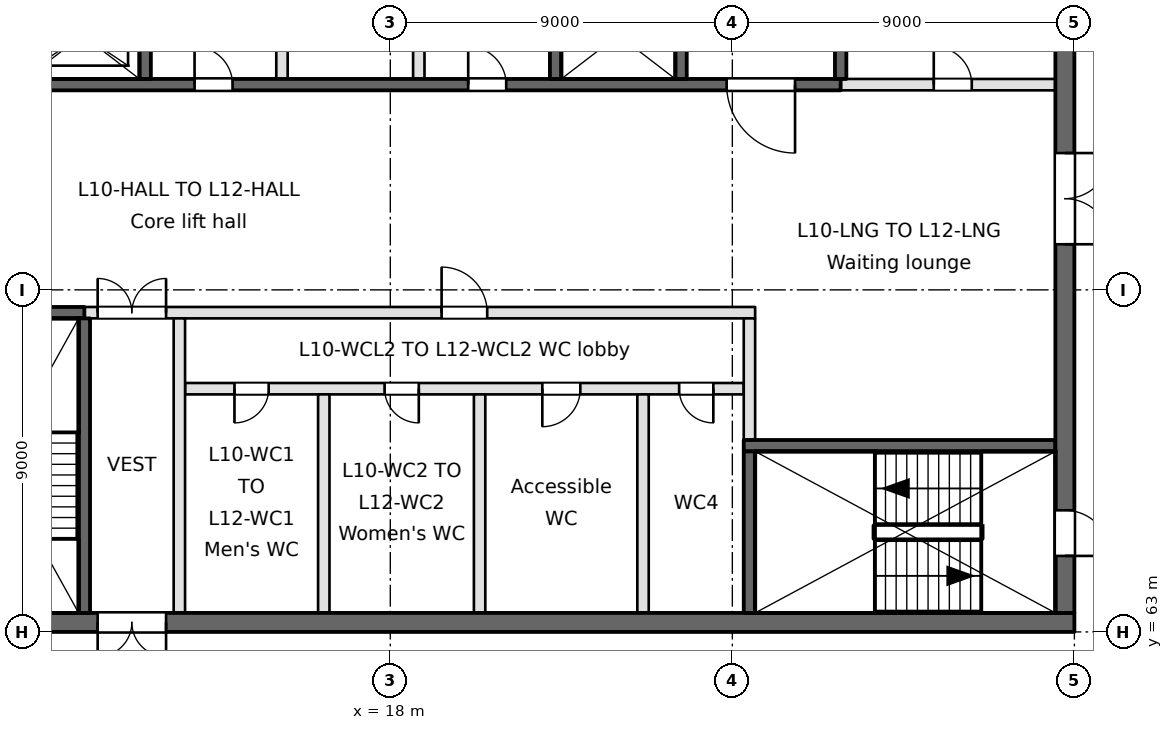
"""IFC4 building model, lengths in metres.
Left out: names, types, materials, properties, quantities, classifications, styles, units other than length and angle.
Written with IfcOpenShell. Run it as: python <this file> out.ifc"""

import sys

from ifc_helpers import new_model, si_unit, direction, frame, frame_2d, origin, place, context, subcontext, project, spatial, rectangle, extrude, element, fill, save


model = new_model("IFC4")
c1 = context("Model", 3, precision=1e-05, world=origin(), true_north=direction((0.0, 1.0)))
c2 = subcontext(c1, "Body", "Model", "MODEL_VIEW")
j1 = project(units=[si_unit("LENGTHUNIT", "METRE"), si_unit("PLANEANGLEUNIT", "RADIAN")], contexts=[c1])
p1 = place(None, origin())
s1 = spatial("IfcSite", under=j1, at=p1, CompositionType="ELEMENT")
p2 = place(p1, origin())
s2 = spatial("IfcBuilding", under=s1, at=p2, CompositionType="ELEMENT")
p3 = place(p2, frame((0.0, 0.0, 46.9)))
s3 = spatial("IfcBuildingStorey", under=s2, at=p3, CompositionType="ELEMENT", Elevation=46.9)
p4 = place(p3, frame((0.9, 63.25, -0.4), z_axis=(0.0, 0.0, 1.0), x_axis=(1.0, 0.0, 0.0)))
e1 = element("IfcWall", 1, at=p4, inside=s3, PredefinedType="SOLIDWALL", context=c2, shape_type="SweptSolid", body=[
    extrude(rectangle(XDim=35.1, YDim=0.5, at=frame_2d((17.55, 0.0))), origin(), (0.0, 0.0, 1.0), 3.7),
])
p5 = place(p4, frame((9.4, 0.0, 0.4)))
e2 = element("IfcOpeningElement", 2, at=p5, cuts=e1, PredefinedType="OPENING", context=c2, shape_type="SweptSolid", body=[
    extrude(rectangle(XDim=1.8, YDim=2.1, at=frame_2d((0.9, 1.05))), frame((0.0, 0.25, 0.0), z_axis=(0.0, -1.0, 0.0), x_axis=(1.0, 0.0, 0.0)), (0.0, 0.0, 1.0), 0.5),
])
p6 = place(p4, frame((1.55, 0.0, 0.4)))
e3 = element("IfcOpeningElement", 3, at=p6, cuts=e1, PredefinedType="OPENING", context=c2, shape_type="SweptSolid", body=[
    extrude(rectangle(XDim=1.2, YDim=2.1, at=frame_2d((0.6, 1.05))), frame((0.0, 0.25, 0.0), z_axis=(0.0, -1.0, 0.0), x_axis=(1.0, 0.0, 0.0)), (0.0, 0.0, 1.0), 0.5),
])
p7 = place(p4, frame((6.15, 0.0, 0.4)))
e4 = element("IfcOpeningElement", 4, at=p7, cuts=e1, PredefinedType="OPENING", context=c2, shape_type="SweptSolid", body=[
    extrude(rectangle(XDim=1.2, YDim=2.1, at=frame_2d((0.6, 1.05))), frame((0.0, 0.25, 0.0), z_axis=(0.0, -1.0, 0.0), x_axis=(1.0, 0.0, 0.0)), (0.0, 0.0, 1.0), 0.5),
])
p8 = place(p3, frame((27.3, 67.9, -0.4), z_axis=(0.0, 0.0, 1.0), x_axis=(1.0, 0.0, 0.0)))
e5 = element("IfcWall", 5, at=p8, inside=s3, PredefinedType="SOLIDWALL", context=c2, shape_type="SweptSolid", body=[
    extrude(rectangle(XDim=8.2, YDim=0.3, at=frame_2d((4.1, 0.0))), origin(), (0.0, 0.0, 1.0), 3.7),
])
p9 = place(p3, frame((12.6, 69.4, 0.0), z_axis=(0.0, 0.0, 1.0), x_axis=(1.0, 0.0, 0.0)))
e6 = element("IfcWall", 6, at=p9, inside=s3, PredefinedType="PARTITIONING", context=c2, shape_type="SweptSolid", body=[
    extrude(rectangle(XDim=14.7, YDim=0.3, at=frame_2d((7.35, 0.0))), origin(), (0.0, 0.0, 1.0), 3.3),
])
p10 = place(p9, frame((1.3, 0.0, 0.0)))
e7 = element("IfcOpeningElement", 7, at=p10, cuts=e6, PredefinedType="OPENING", context=c2, shape_type="SweptSolid", body=[
    extrude(rectangle(XDim=0.9, YDim=2.1, at=frame_2d((0.45, 1.05))), frame((0.0, 0.15, 0.0), z_axis=(0.0, -1.0, 0.0), x_axis=(1.0, 0.0, 0.0)), (0.0, 0.0, 1.0), 0.3),
])
p11 = place(p9, frame((5.25, 0.0, 0.0)))
e8 = element("IfcOpeningElement", 8, at=p11, cuts=e6, PredefinedType="OPENING", context=c2, shape_type="SweptSolid", body=[
    extrude(rectangle(XDim=0.9, YDim=2.1, at=frame_2d((0.45, 1.05))), frame((0.0, 0.15, 0.0), z_axis=(0.0, -1.0, 0.0), x_axis=(1.0, 0.0, 0.0)), (0.0, 0.0, 1.0), 0.3),
])
p12 = place(p9, frame((9.4, 0.0, 0.0)))
e9 = element("IfcOpeningElement", 9, at=p12, cuts=e6, PredefinedType="OPENING", context=c2, shape_type="SweptSolid", body=[
    extrude(rectangle(XDim=1.0, YDim=2.1, at=frame_2d((0.5, 1.05))), frame((0.0, 0.15, 0.0), z_axis=(0.0, -1.0, 0.0), x_axis=(1.0, 0.0, 0.0)), (0.0, 0.0, 1.0), 0.3),
])
p13 = place(p9, frame((13.0, 0.0, 0.0)))
e10 = element("IfcOpeningElement", 10, at=p13, cuts=e6, PredefinedType="OPENING", context=c2, shape_type="SweptSolid", body=[
    extrude(rectangle(XDim=0.9, YDim=2.1, at=frame_2d((0.45, 1.05))), frame((0.0, 0.15, 0.0), z_axis=(0.0, -1.0, 0.0), x_axis=(1.0, 0.0, 0.0)), (0.0, 0.0, 1.0), 0.3),
])
p14 = place(p3, frame((0.9, 71.4, -0.4), z_axis=(0.0, 0.0, 1.0), x_axis=(1.0, 0.0, 0.0)))
e11 = element("IfcWall", 11, at=p14, inside=s3, PredefinedType="SOLIDWALL", context=c2, shape_type="SweptSolid", body=[
    extrude(rectangle(XDim=9.05, YDim=0.3, at=frame_2d((4.525, 0.0))), origin(), (0.0, 0.0, 1.0), 3.7),
])
p15 = place(p3, frame((9.95, 71.4, 0.0), z_axis=(0.0, 0.0, 1.0), x_axis=(1.0, 0.0, 0.0)))
e12 = element("IfcWall", 12, at=p15, inside=s3, PredefinedType="PARTITIONING", context=c2, shape_type="SweptSolid", body=[
    extrude(rectangle(XDim=17.65, YDim=0.3, at=frame_2d((8.825, 0.0))), origin(), (0.0, 0.0, 1.0), 3.3),
])
p16 = place(p15, frame((0.35, 0.0, 0.0)))
e13 = element("IfcOpeningElement", 13, at=p16, cuts=e12, PredefinedType="OPENING", context=c2, shape_type="SweptSolid", body=[
    extrude(rectangle(XDim=1.8, YDim=2.1, at=frame_2d((0.9, 1.05))), frame((0.0, 0.15, 0.0), z_axis=(0.0, -1.0, 0.0), x_axis=(1.0, 0.0, 0.0)), (0.0, 0.0, 1.0), 0.3),
])
p17 = place(p15, frame((9.4, 0.0, 0.0)))
e14 = element("IfcOpeningElement", 14, at=p17, cuts=e12, PredefinedType="OPENING", context=c2, shape_type="SweptSolid", body=[
    extrude(rectangle(XDim=1.2, YDim=2.1, at=frame_2d((0.6, 1.05))), frame((0.0, 0.15, 0.0), z_axis=(0.0, -1.0, 0.0), x_axis=(1.0, 0.0, 0.0)), (0.0, 0.0, 1.0), 0.3),
])
p18 = place(p3, frame((0.9, 77.4, -0.4), z_axis=(0.0, 0.0, 1.0), x_axis=(1.0, 0.0, 0.0)))
e15 = element("IfcWall", 15, at=p18, inside=s3, PredefinedType="SOLIDWALL", context=c2, shape_type="SweptSolid", body=[
    extrude(rectangle(XDim=28.95, YDim=0.3, at=frame_2d((14.475, 0.0))), origin(), (0.0, 0.0, 1.0), 3.7),
])
p19 = place(p18, frame((4.35, 0.0, 0.4)))
e16 = element("IfcOpeningElement", 16, at=p19, cuts=e15, PredefinedType="OPENING", context=c2, shape_type="SweptSolid", body=[
    extrude(rectangle(XDim=1.8, YDim=2.1, at=frame_2d((0.9, 1.05))), frame((0.0, 0.15, 0.0), z_axis=(0.0, -1.0, 0.0), x_axis=(1.0, 0.0, 0.0)), (0.0, 0.0, 1.0), 0.3),
])
p20 = place(p18, frame((25.95, 0.0, 0.4)))
e17 = element("IfcOpeningElement", 17, at=p20, cuts=e15, PredefinedType="OPENING", context=c2, shape_type="SweptSolid", body=[
    extrude(rectangle(XDim=1.8, YDim=2.1, at=frame_2d((0.9, 1.05))), frame((0.0, 0.15, 0.0), z_axis=(0.0, -1.0, 0.0), x_axis=(1.0, 0.0, 0.0)), (0.0, 0.0, 1.0), 0.3),
])
p21 = place(p18, frame((11.95, 0.0, 0.4)))
e18 = element("IfcOpeningElement", 18, at=p21, cuts=e15, PredefinedType="OPENING", context=c2, shape_type="SweptSolid", body=[
    extrude(rectangle(XDim=1.0, YDim=2.1, at=frame_2d((0.5, 1.05))), frame((0.0, 0.15, 0.0), z_axis=(0.0, -1.0, 0.0), x_axis=(1.0, 0.0, 0.0)), (0.0, 0.0, 1.0), 0.3),
])
p22 = place(p18, frame((19.15, 0.0, 0.4)))
e19 = element("IfcOpeningElement", 19, at=p22, cuts=e15, PredefinedType="OPENING", context=c2, shape_type="SweptSolid", body=[
    extrude(rectangle(XDim=1.0, YDim=2.1, at=frame_2d((0.5, 1.05))), frame((0.0, 0.15, 0.0), z_axis=(0.0, -1.0, 0.0), x_axis=(1.0, 0.0, 0.0)), (0.0, 0.0, 1.0), 0.3),
])
p23 = place(p3, frame((29.85, 77.4, 0.0), z_axis=(0.0, 0.0, 1.0), x_axis=(1.0, 0.0, 0.0)))
e20 = element("IfcWall", 20, at=p23, inside=s3, PredefinedType="PARTITIONING", context=c2, shape_type="SweptSolid", body=[
    extrude(rectangle(XDim=5.65, YDim=0.3, at=frame_2d((2.825, 0.0))), origin(), (0.0, 0.0, 1.0), 3.3),
])
p24 = place(p23, frame((2.45, 0.0, 0.0)))
e21 = element("IfcOpeningElement", 21, at=p24, cuts=e20, PredefinedType="OPENING", context=c2, shape_type="SweptSolid", body=[
    extrude(rectangle(XDim=1.0, YDim=2.1, at=frame_2d((0.5, 1.05))), frame((0.0, 0.15, 0.0), z_axis=(0.0, -1.0, 0.0), x_axis=(1.0, 0.0, 0.0)), (0.0, 0.0, 1.0), 0.3),
])
p25 = place(p3, frame((9.95, 63.5, -0.4), z_axis=(0.0, 0.0, 1.0), x_axis=(0.0, 1.0, 0.0)))
e22 = element("IfcWall", 22, at=p25, inside=s3, PredefinedType="SOLIDWALL", context=c2, shape_type="SweptSolid", body=[
    extrude(rectangle(XDim=7.75, YDim=0.3, at=frame_2d((3.875, 0.0))), origin(), (0.0, 0.0, 1.0), 3.7),
])
p26 = place(p3, frame((11.55, 77.55, -0.4), z_axis=(0.0, 0.0, 1.0), x_axis=(0.0, 1.0, 0.0)))
e23 = element("IfcWall", 23, at=p26, inside=s3, PredefinedType="SOLIDWALL", context=c2, shape_type="SweptSolid", body=[
    extrude(rectangle(XDim=10.1, YDim=0.3, at=frame_2d((5.05, 0.0))), origin(), (0.0, 0.0, 1.0), 3.7),
])
p27 = place(p3, frame((12.45, 63.5, 0.0), z_axis=(0.0, 0.0, 1.0), x_axis=(0.0, 1.0, 0.0)))
e24 = element("IfcWall", 24, at=p27, inside=s3, PredefinedType="PARTITIONING", context=c2, shape_type="SweptSolid", body=[
    extrude(rectangle(XDim=7.75, YDim=0.3, at=frame_2d((3.875, 0.0))), origin(), (0.0, 0.0, 1.0), 3.3),
])
p28 = place(p3, frame((15.15, 77.55, 0.0), z_axis=(0.0, 0.0, 1.0), x_axis=(0.0, 1.0, 0.0)))
e25 = element("IfcWall", 25, at=p28, inside=s3, PredefinedType="PARTITIONING", context=c2, shape_type="SweptSolid", body=[
    extrude(rectangle(XDim=12.95, YDim=0.3, at=frame_2d((6.475, 0.0))), origin(), (0.0, 0.0, 1.0), 3.3),
])
p29 = place(p3, frame((16.25, 63.5, 0.0), z_axis=(0.0, 0.0, 1.0), x_axis=(0.0, 1.0, 0.0)))
e26 = element("IfcWall", 26, at=p29, inside=s3, PredefinedType="PARTITIONING", context=c2, shape_type="SweptSolid", body=[
    extrude(rectangle(XDim=5.75, YDim=0.3, at=frame_2d((2.875, 0.0))), origin(), (0.0, 0.0, 1.0), 3.3),
])
p30 = place(p3, frame((18.75, 77.55, 0.0), z_axis=(0.0, 0.0, 1.0), x_axis=(0.0, 1.0, 0.0)))
e27 = element("IfcWall", 27, at=p30, inside=s3, PredefinedType="PARTITIONING", context=c2, shape_type="SweptSolid", body=[
    extrude(rectangle(XDim=12.95, YDim=0.3, at=frame_2d((6.475, 0.0))), origin(), (0.0, 0.0, 1.0), 3.3),
])
p31 = place(p3, frame((20.35, 63.5, 0.0), z_axis=(0.0, 0.0, 1.0), x_axis=(0.0, 1.0, 0.0)))
e28 = element("IfcWall", 28, at=p31, inside=s3, PredefinedType="PARTITIONING", context=c2, shape_type="SweptSolid", body=[
    extrude(rectangle(XDim=5.75, YDim=0.3, at=frame_2d((2.875, 0.0))), origin(), (0.0, 0.0, 1.0), 3.3),
])
p32 = place(p3, frame((22.35, 77.55, -0.4), z_axis=(0.0, 0.0, 1.0), x_axis=(0.0, 1.0, 0.0)))
e29 = element("IfcWall", 29, at=p32, inside=s3, PredefinedType="SOLIDWALL", context=c2, shape_type="SweptSolid", body=[
    extrude(rectangle(XDim=10.1, YDim=0.3, at=frame_2d((5.05, 0.0))), origin(), (0.0, 0.0, 1.0), 3.7),
])
p33 = place(p3, frame((24.65, 63.5, 0.0), z_axis=(0.0, 0.0, 1.0), x_axis=(0.0, 1.0, 0.0)))
e30 = element("IfcWall", 30, at=p33, inside=s3, PredefinedType="PARTITIONING", context=c2, shape_type="SweptSolid", body=[
    extrude(rectangle(XDim=5.75, YDim=0.3, at=frame_2d((2.875, 0.0))), origin(), (0.0, 0.0, 1.0), 3.3),
])
p34 = place(p3, frame((25.65, 77.55, -0.4), z_axis=(0.0, 0.0, 1.0), x_axis=(0.0, 1.0, 0.0)))
e31 = element("IfcWall", 31, at=p34, inside=s3, PredefinedType="SOLIDWALL", context=c2, shape_type="SweptSolid", body=[
    extrude(rectangle(XDim=10.1, YDim=0.3, at=frame_2d((5.05, 0.0))), origin(), (0.0, 0.0, 1.0), 3.7),
])
p35 = place(p3, frame((27.45, 63.5, -0.4), z_axis=(0.0, 0.0, 1.0), x_axis=(0.0, 1.0, 0.0)))
e32 = element("IfcWall", 32, at=p35, inside=s3, PredefinedType="SOLIDWALL", context=c2, shape_type="SweptSolid", body=[
    extrude(rectangle(XDim=4.25, YDim=0.3, at=frame_2d((2.125, 0.0))), origin(), (0.0, 0.0, 1.0), 3.7),
])
p36 = place(p3, frame((27.45, 68.05, 0.0), z_axis=(0.0, 0.0, 1.0), x_axis=(0.0, 1.0, 0.0)))
e33 = element("IfcWall", 33, at=p36, inside=s3, PredefinedType="PARTITIONING", context=c2, shape_type="SweptSolid", body=[
    extrude(rectangle(XDim=3.2, YDim=0.3, at=frame_2d((1.6, 0.0))), origin(), (0.0, 0.0, 1.0), 3.3),
])
p37 = place(p3, frame((29.85, 77.55, -0.4), z_axis=(0.0, 0.0, 1.0), x_axis=(0.0, 1.0, 0.0)))
e34 = element("IfcWall", 34, at=p37, inside=s3, PredefinedType="SOLIDWALL", context=c2, shape_type="SweptSolid", body=[
    extrude(rectangle(XDim=10.1, YDim=0.3, at=frame_2d((5.05, 0.0))), origin(), (0.0, 0.0, 1.0), 3.7),
])
p38 = place(p3, frame((35.75, 63.5, -0.4), z_axis=(0.0, 0.0, 1.0), x_axis=(0.0, 1.0, 0.0)))
e35 = element("IfcWall", 35, at=p38, inside=s3, PredefinedType="SOLIDWALL", context=c2, shape_type="SweptSolid", body=[
    extrude(rectangle(XDim=34.6, YDim=0.5, at=frame_2d((17.3, 0.0))), origin(), (0.0, 0.0, 1.0), 3.7),
])
p39 = place(p38, frame((9.7, 0.0, 0.4)))
e36 = element("IfcOpeningElement", 36, at=p39, cuts=e35, PredefinedType="OPENING", context=c2, shape_type="SweptSolid", body=[
    extrude(rectangle(XDim=2.4, YDim=2.1, at=frame_2d((1.2, 1.05))), frame((0.0, 0.25, 0.0), z_axis=(0.0, -1.0, 0.0), x_axis=(1.0, 0.0, 0.0)), (0.0, 0.0, 1.0), 0.5),
])
p40 = place(p38, frame((27.9, 0.0, 0.4)))
e37 = element("IfcOpeningElement", 37, at=p40, cuts=e35, PredefinedType="OPENING", context=c2, shape_type="SweptSolid", body=[
    extrude(rectangle(XDim=1.5, YDim=2.1, at=frame_2d((0.75, 1.05))), frame((0.0, 0.25, 0.0), z_axis=(0.0, -1.0, 0.0), x_axis=(1.0, 0.0, 0.0)), (0.0, 0.0, 1.0), 0.5),
])
p41 = place(p38, frame((1.5, 0.0, 0.4)))
e38 = element("IfcOpeningElement", 38, at=p41, cuts=e35, PredefinedType="OPENING", context=c2, shape_type="SweptSolid", body=[
    extrude(rectangle(XDim=1.2, YDim=2.1, at=frame_2d((0.6, 1.05))), frame((0.0, 0.25, 0.0), z_axis=(0.0, -1.0, 0.0), x_axis=(1.0, 0.0, 0.0)), (0.0, 0.0, 1.0), 0.5),
])
p42 = place(p20, frame((1.8, 0.0, 0.0), z_axis=(0.0, 0.0, 1.0), x_axis=(-1.0, 0.0, 0.0)))
e39 = element("IfcDoor", 39, at=p42, inside=s3, OperationType="SINGLE_SWING_LEFT", PredefinedType="DOOR", context=c2, shape_type="SweptSolid", body=[
    extrude(rectangle(XDim=1.8, YDim=2.1, at=frame_2d((0.9, 1.05))), frame((0.0, 0.025, 0.0), z_axis=(0.0, -1.0, 0.0), x_axis=(1.0, 0.0, 0.0)), (0.0, 0.0, 1.0), 0.05),
])
fill(e17, e39)
p43 = place(p39, frame((2.4, 0.0, 0.0), z_axis=(0.0, 0.0, 1.0), x_axis=(-1.0, 0.0, 0.0)))
e40 = element("IfcDoor", 40, at=p43, inside=s3, OperationType="DOUBLE_DOOR_SINGLE_SWING", PredefinedType="DOOR", context=c2, shape_type="SweptSolid", body=[
    extrude(rectangle(XDim=2.4, YDim=2.1, at=frame_2d((1.2, 1.05))), frame((0.0, 0.025, 0.0), z_axis=(0.0, -1.0, 0.0), x_axis=(1.0, 0.0, 0.0)), (0.0, 0.0, 1.0), 0.05),
])
fill(e36, e40)
p44 = place(p5, frame((1.8, 0.0, 0.0), z_axis=(0.0, 0.0, 1.0), x_axis=(-1.0, 0.0, 0.0)))
e41 = element("IfcDoor", 41, at=p44, inside=s3, OperationType="DOUBLE_DOOR_SINGLE_SWING", PredefinedType="DOOR", context=c2, shape_type="SweptSolid", body=[
    extrude(rectangle(XDim=1.8, YDim=2.1, at=frame_2d((0.9, 1.05))), frame((0.0, 0.025, 0.0), z_axis=(0.0, -1.0, 0.0), x_axis=(1.0, 0.0, 0.0)), (0.0, 0.0, 1.0), 0.05),
])
fill(e2, e41)
p45 = place(p16, origin())
e42 = element("IfcDoor", 42, at=p45, inside=s3, OperationType="DOUBLE_DOOR_SINGLE_SWING", PredefinedType="DOOR", context=c2, shape_type="SweptSolid", body=[
    extrude(rectangle(XDim=1.8, YDim=2.1, at=frame_2d((0.9, 1.05))), frame((0.0, 0.025, 0.0), z_axis=(0.0, -1.0, 0.0), x_axis=(1.0, 0.0, 0.0)), (0.0, 0.0, 1.0), 0.05),
])
fill(e13, e42)
p46 = place(p10, frame((0.9, 0.0, 0.0), z_axis=(0.0, 0.0, 1.0), x_axis=(-1.0, 0.0, 0.0)))
e43 = element("IfcDoor", 43, at=p46, inside=s3, OperationType="SINGLE_SWING_RIGHT", PredefinedType="DOOR", context=c2, shape_type="SweptSolid", body=[
    extrude(rectangle(XDim=0.9, YDim=2.1, at=frame_2d((0.45, 1.05))), frame((0.0, 0.025, 0.0), z_axis=(0.0, -1.0, 0.0), x_axis=(1.0, 0.0, 0.0)), (0.0, 0.0, 1.0), 0.05),
])
fill(e7, e43)
p47 = place(p11, frame((0.9, 0.0, 0.0), z_axis=(0.0, 0.0, 1.0), x_axis=(-1.0, 0.0, 0.0)))
e44 = element("IfcDoor", 44, at=p47, inside=s3, OperationType="SINGLE_SWING_LEFT", PredefinedType="DOOR", context=c2, shape_type="SweptSolid", body=[
    extrude(rectangle(XDim=0.9, YDim=2.1, at=frame_2d((0.45, 1.05))), frame((0.0, 0.025, 0.0), z_axis=(0.0, -1.0, 0.0), x_axis=(1.0, 0.0, 0.0)), (0.0, 0.0, 1.0), 0.05),
])
fill(e8, e44)
p48 = place(p12, frame((1.0, 0.0, 0.0), z_axis=(0.0, 0.0, 1.0), x_axis=(-1.0, 0.0, 0.0)))
e45 = element("IfcDoor", 45, at=p48, inside=s3, OperationType="SINGLE_SWING_RIGHT", PredefinedType="DOOR", context=c2, shape_type="SweptSolid", body=[
    extrude(rectangle(XDim=1.0, YDim=2.1, at=frame_2d((0.5, 1.05))), frame((0.0, 0.025, 0.0), z_axis=(0.0, -1.0, 0.0), x_axis=(1.0, 0.0, 0.0)), (0.0, 0.0, 1.0), 0.05),
])
fill(e9, e45)
p49 = place(p13, frame((0.9, 0.0, 0.0), z_axis=(0.0, 0.0, 1.0), x_axis=(-1.0, 0.0, 0.0)))
e46 = element("IfcDoor", 46, at=p49, inside=s3, OperationType="SINGLE_SWING_LEFT", PredefinedType="DOOR", context=c2, shape_type="SweptSolid", body=[
    extrude(rectangle(XDim=0.9, YDim=2.1, at=frame_2d((0.45, 1.05))), frame((0.0, 0.025, 0.0), z_axis=(0.0, -1.0, 0.0), x_axis=(1.0, 0.0, 0.0)), (0.0, 0.0, 1.0), 0.05),
])
fill(e10, e46)
p50 = place(p17, origin())
e47 = element("IfcDoor", 47, at=p50, inside=s3, OperationType="SINGLE_SWING_LEFT", PredefinedType="DOOR", context=c2, shape_type="SweptSolid", body=[
    extrude(rectangle(XDim=1.2, YDim=2.1, at=frame_2d((0.6, 1.05))), frame((0.0, 0.025, 0.0), z_axis=(0.0, -1.0, 0.0), x_axis=(1.0, 0.0, 0.0)), (0.0, 0.0, 1.0), 0.05),
])
fill(e14, e47)
p51 = place(p41, frame((1.2, 0.0, 0.0), z_axis=(0.0, 0.0, 1.0), x_axis=(-1.0, 0.0, 0.0)))
e48 = element("IfcDoor", 48, at=p51, inside=s3, OperationType="SINGLE_SWING_RIGHT", PredefinedType="DOOR", context=c2, shape_type="SweptSolid", body=[
    extrude(rectangle(XDim=1.2, YDim=2.1, at=frame_2d((0.6, 1.05))), frame((0.0, 0.025, 0.0), z_axis=(0.0, -1.0, 0.0), x_axis=(1.0, 0.0, 0.0)), (0.0, 0.0, 1.0), 0.05),
])
fill(e38, e48)
p52 = place(p21, origin())
e49 = element("IfcDoor", 49, at=p52, inside=s3, OperationType="SINGLE_SWING_LEFT", PredefinedType="DOOR", context=c2, shape_type="SweptSolid", body=[
    extrude(rectangle(XDim=1.0, YDim=2.1, at=frame_2d((0.5, 1.05))), frame((0.0, 0.025, 0.0), z_axis=(0.0, -1.0, 0.0), x_axis=(1.0, 0.0, 0.0)), (0.0, 0.0, 1.0), 0.05),
])
fill(e18, e49)
p53 = place(p22, origin())
e50 = element("IfcDoor", 50, at=p53, inside=s3, OperationType="SINGLE_SWING_LEFT", PredefinedType="DOOR", context=c2, shape_type="SweptSolid", body=[
    extrude(rectangle(XDim=1.0, YDim=2.1, at=frame_2d((0.5, 1.05))), frame((0.0, 0.025, 0.0), z_axis=(0.0, -1.0, 0.0), x_axis=(1.0, 0.0, 0.0)), (0.0, 0.0, 1.0), 0.05),
])
fill(e19, e50)
p54 = place(p24, origin())
e51 = element("IfcDoor", 51, at=p54, inside=s3, OperationType="SINGLE_SWING_LEFT", PredefinedType="DOOR", context=c2, shape_type="SweptSolid", body=[
    extrude(rectangle(XDim=1.0, YDim=2.1, at=frame_2d((0.5, 1.05))), frame((0.0, 0.025, 0.0), z_axis=(0.0, -1.0, 0.0), x_axis=(1.0, 0.0, 0.0)), (0.0, 0.0, 1.0), 0.05),
])
fill(e21, e51)
save(model, sys.argv[1])
